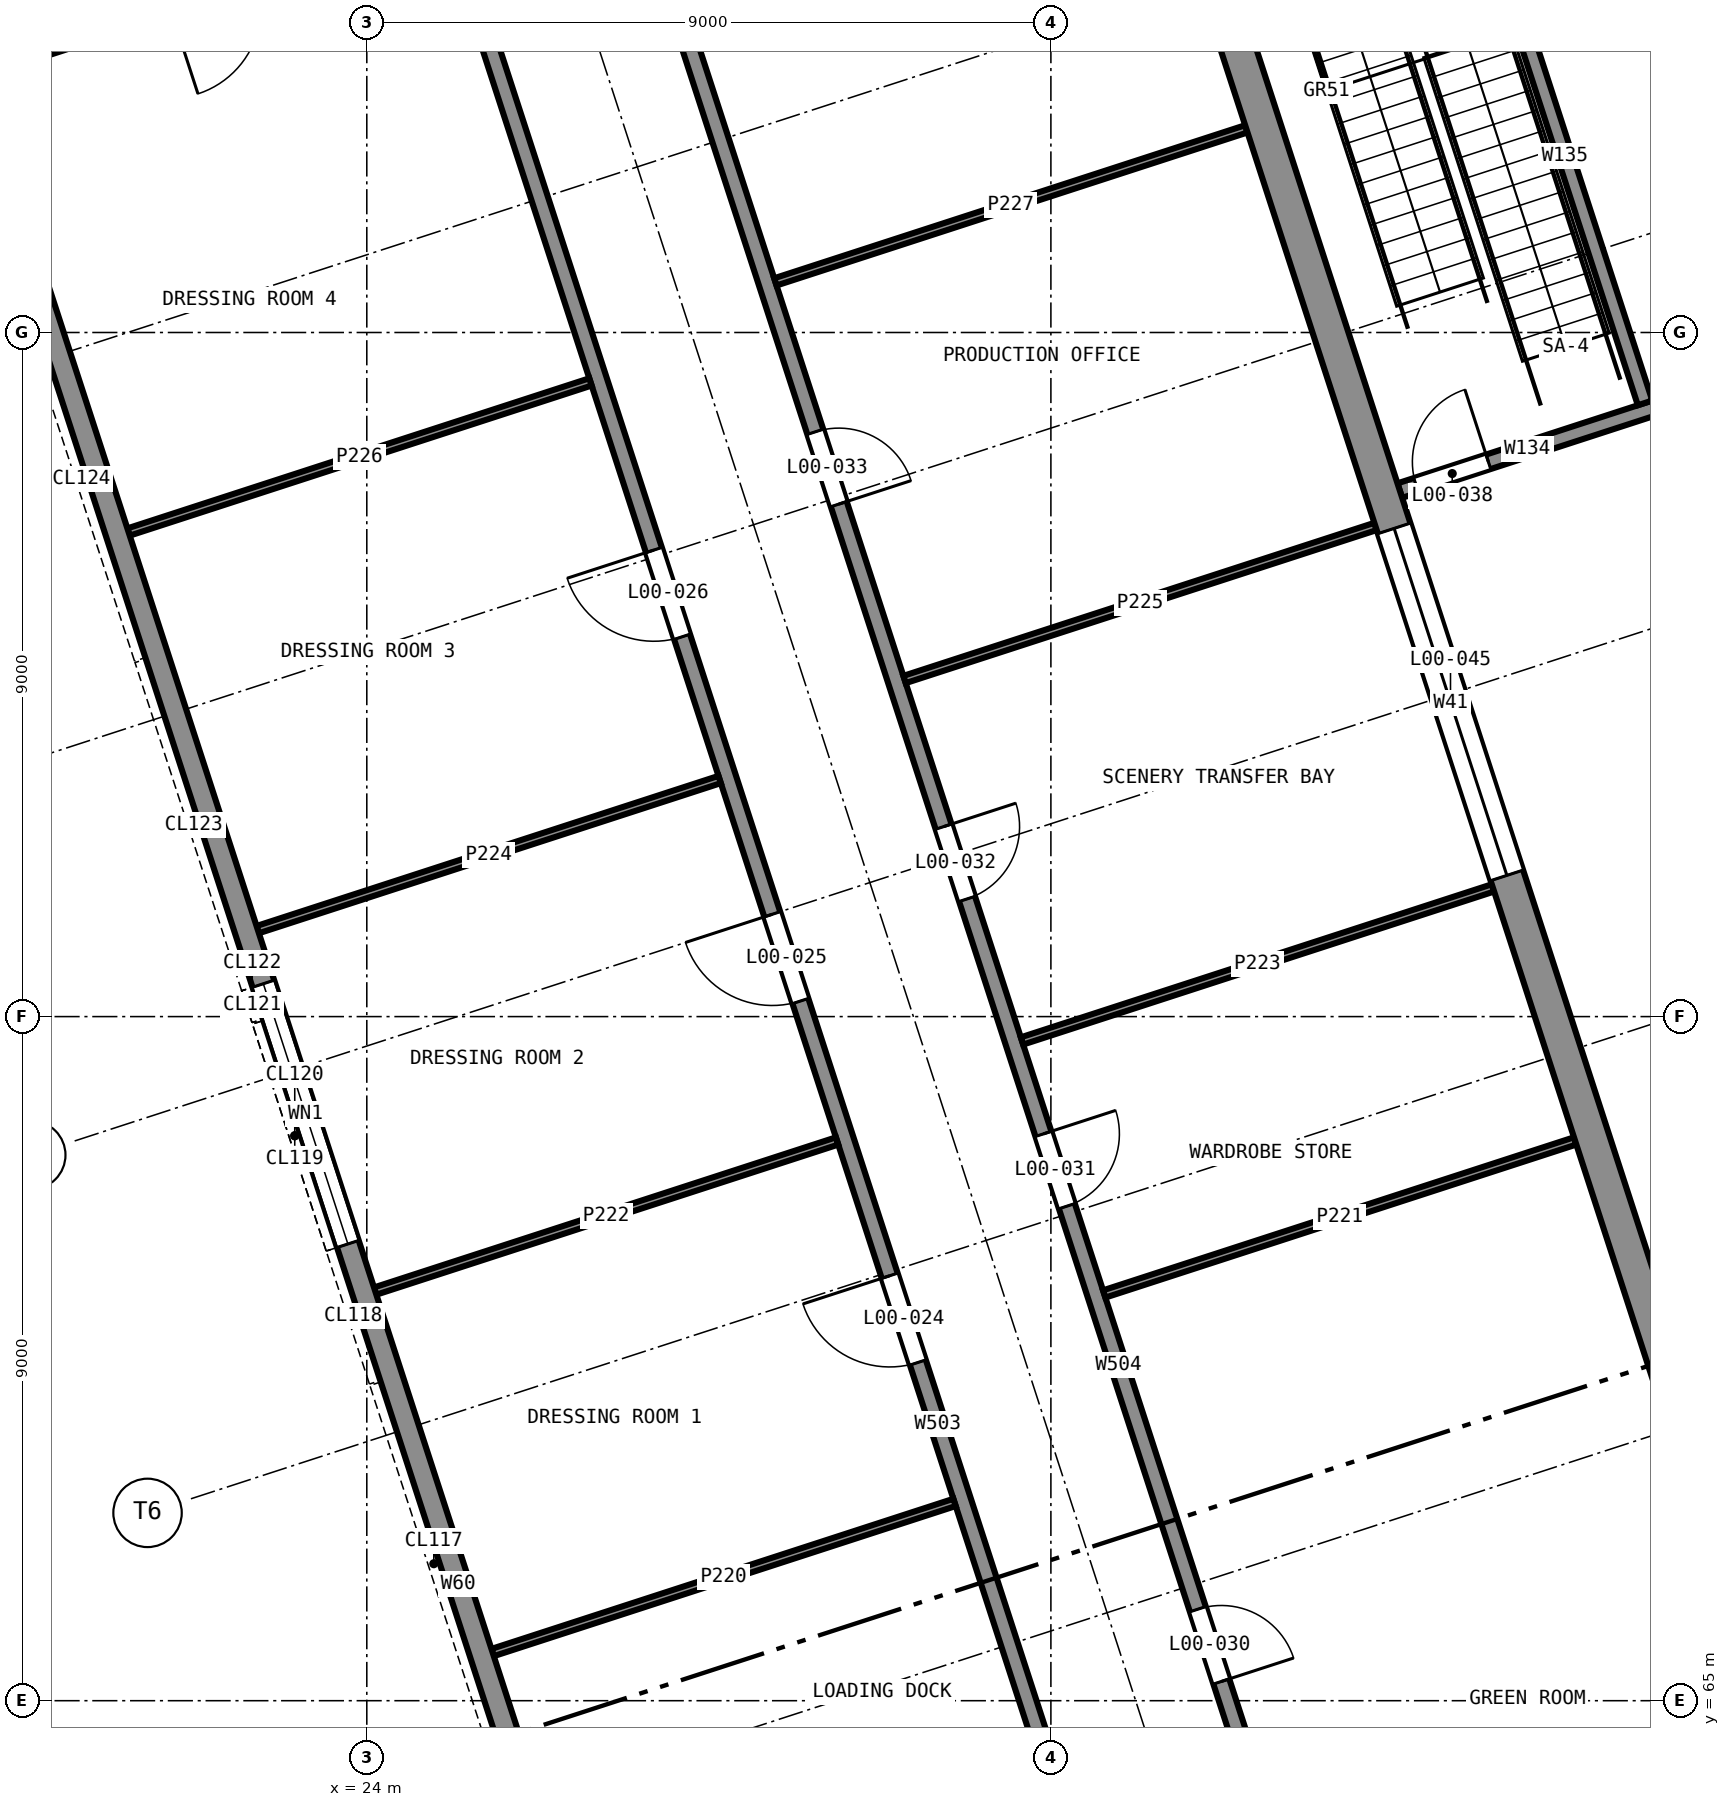
"""IFC4 building model, lengths in metres.
Left out: names, types, materials, properties, quantities, classifications, styles, units other than length and angle.
Written with IfcOpenShell. Run it as: python <this file> out.ifc"""

import sys

from ifc_helpers import new_model, si_unit, direction, frame, frame_2d, origin, place, context, subcontext, project, spatial, rectangle, extrude, element, fill, save


model = new_model("IFC4")
c1 = context("Model", 3, precision=1e-05, world=origin(), true_north=direction((0.0, 1.0)))
c2 = subcontext(c1, "Body", "Model", "MODEL_VIEW")
j1 = project(units=[si_unit("LENGTHUNIT", "METRE"), si_unit("PLANEANGLEUNIT", "RADIAN")], contexts=[c1])
p1 = place(None, origin())
s1 = spatial("IfcSite", under=j1, at=p1, CompositionType="ELEMENT")
p2 = place(p1, origin())
s2 = spatial("IfcBuilding", under=s1, at=p2, CompositionType="ELEMENT")
p3 = place(p2, origin())
s3 = spatial("IfcBuildingStorey", under=s2, at=p3, CompositionType="ELEMENT", Elevation=0.0)
p4 = place(p3, frame((41.286, 68.82, 0.0), z_axis=(0.0, 0.0, 1.0), x_axis=(-0.309008517326, 0.951059270613, 0.0)))
e1 = element("IfcWall", 1, at=p4, inside=s3, PredefinedType="SHEAR", context=c2, shape_type="SweptSolid", body=[
    extrude(rectangle(XDim=19.575, YDim=0.45, at=frame_2d((9.788, 0.0))), origin(), (0.0, 0.0, 1.0), 5.5),
])
p5 = place(p4, frame((7.4, 0.0, 0.0)))
e2 = element("IfcOpeningElement", 2, at=p5, cuts=e1, PredefinedType="OPENING", context=c2, shape_type="SweptSolid", body=[
    extrude(rectangle(XDim=4.8, YDim=4.5, at=frame_2d((2.4, 2.25))), frame((0.0, 0.235, 0.0), z_axis=(0.0, -1.0, 0.0), x_axis=(1.0, 0.0, 0.0)), (0.0, 0.0, 1.0), 0.47),
])
p6 = place(p3, frame((33.501, 41.003, 0.0), z_axis=(0.0, 0.0, 1.0), x_axis=(-0.309017194826, 0.951056451165, 0.0)))
e3 = element("IfcWall", 3, at=p6, inside=s3, PredefinedType="SOLIDWALL", context=c2, shape_type="SweptSolid", body=[
    extrude(rectangle(XDim=53.7, YDim=0.3, at=frame_2d((26.85, 0.0))), origin(), (0.0, 0.0, 1.0), 5.5),
])
p7 = place(p6, frame((31.55, 0.0, 0.9)))
e4 = element("IfcOpeningElement", 4, at=p7, cuts=e3, PredefinedType="OPENING", context=c2, shape_type="SweptSolid", body=[
    extrude(rectangle(XDim=3.6, YDim=2.1, at=frame_2d((1.8, 1.05))), frame((0.0, 0.16, 0.0), z_axis=(0.0, -1.0, 0.0), x_axis=(1.0, 0.0, 0.0)), (0.0, 0.0, 1.0), 0.32),
])
p8 = place(p6, frame((3.0, 0.0, 0.0)))
e5 = element("IfcOpeningElement", 5, at=p8, cuts=e3, PredefinedType="OPENING", context=c2, shape_type="SweptSolid", body=[
    extrude(rectangle(XDim=1.1, YDim=2.1, at=frame_2d((0.55, 1.05))), frame((0.0, 0.16, 0.0), z_axis=(0.0, -1.0, 0.0), x_axis=(1.0, 0.0, 0.0)), (0.0, 0.0, 1.0), 0.32),
])
p9 = place(p6, frame((12.6, 0.0, 0.0)))
e6 = element("IfcOpeningElement", 6, at=p9, cuts=e3, PredefinedType="OPENING", context=c2, shape_type="SweptSolid", body=[
    extrude(rectangle(XDim=4.5, YDim=4.5, at=frame_2d((2.25, 2.25))), frame((0.0, 0.16, 0.0), z_axis=(0.0, -1.0, 0.0), x_axis=(1.0, 0.0, 0.0)), (0.0, 0.0, 1.0), 0.32),
])
p10 = place(p6, frame((19.1, 0.0, 0.0)))
e7 = element("IfcOpeningElement", 7, at=p10, cuts=e3, PredefinedType="OPENING", context=c2, shape_type="SweptSolid", body=[
    extrude(rectangle(XDim=4.5, YDim=4.5, at=frame_2d((2.25, 2.25))), frame((0.0, 0.16, 0.0), z_axis=(0.0, -1.0, 0.0), x_axis=(1.0, 0.0, 0.0)), (0.0, 0.0, 1.0), 0.32),
])
p11 = place(p3, frame((37.591, 80.92, 0.0), z_axis=(0.0, 0.0, 1.0), x_axis=(0.951052389726, 0.30902969436, 0.0)))
e8 = element("IfcWall", 8, at=p11, inside=s3, PredefinedType="SOLIDWALL", context=c2, shape_type="SweptSolid", body=[
    extrude(rectangle(XDim=3.525, YDim=0.2, at=frame_2d((1.763, 0.0))), origin(), (0.0, 0.0, 1.0), 5.5),
])
p12 = place(p11, frame((0.225, 0.0, 0.0)))
e9 = element("IfcOpeningElement", 9, at=p12, cuts=e8, PredefinedType="OPENING", context=c2, shape_type="SweptSolid", body=[
    extrude(rectangle(XDim=1.0, YDim=2.1, at=frame_2d((0.5, 1.05))), frame((0.0, 0.11, 0.0), z_axis=(0.0, -1.0, 0.0), x_axis=(1.0, 0.0, 0.0)), (0.0, 0.0, 1.0), 0.22),
])
p13 = place(p3, frame((40.817, 82.074, 0.0), z_axis=(0.0, 0.0, 1.0), x_axis=(-0.309028643499, 0.951052731186, 0.0)))
e10 = element("IfcWall", 10, at=p13, inside=s3, PredefinedType="SOLIDWALL", context=c2, shape_type="SweptSolid", body=[
    extrude(rectangle(XDim=6.825, YDim=0.2, at=frame_2d((3.413, 0.0))), origin(), (0.0, 0.0, 1.0), 5.5),
])
p14 = place(p3, frame((37.956, 48.812, 0.0), z_axis=(0.0, 0.0, 1.0), x_axis=(-0.30901736393, 0.951056396219, 0.0)))
e11 = element("IfcWall", 11, at=p14, inside=s3, PredefinedType="SOLIDWALL", context=c2, shape_type="SweptSolid", body=[
    extrude(rectangle(XDim=41.7, YDim=0.22, at=frame_2d((20.85, 0.0))), origin(), (0.0, 0.0, 1.0), 5.2),
])
p15 = place(p14, frame((2.009, 0.0, 0.0)))
e12 = element("IfcOpeningElement", 12, at=p15, cuts=e11, PredefinedType="OPENING", context=c2, shape_type="SweptSolid", body=[
    extrude(rectangle(XDim=1.0, YDim=2.1, at=frame_2d((0.5, 1.05))), frame((0.0, 0.12, 0.0), z_axis=(0.0, -1.0, 0.0), x_axis=(1.0, 0.0, 0.0)), (0.0, 0.0, 1.0), 0.24),
])
p16 = place(p14, frame((11.495, 0.0, 0.0)))
e13 = element("IfcOpeningElement", 13, at=p16, cuts=e11, PredefinedType="OPENING", context=c2, shape_type="SweptSolid", body=[
    extrude(rectangle(XDim=1.0, YDim=2.1, at=frame_2d((0.5, 1.05))), frame((0.0, 0.12, 0.0), z_axis=(0.0, -1.0, 0.0), x_axis=(1.0, 0.0, 0.0)), (0.0, 0.0, 1.0), 0.24),
])
p17 = place(p14, frame((21.7, 0.0, 0.0)))
e14 = element("IfcOpeningElement", 14, at=p17, cuts=e11, PredefinedType="OPENING", context=c2, shape_type="SweptSolid", body=[
    extrude(rectangle(XDim=1.2, YDim=2.1, at=frame_2d((0.6, 1.05))), frame((0.0, 0.12, 0.0), z_axis=(0.0, -1.0, 0.0), x_axis=(1.0, 0.0, 0.0)), (0.0, 0.0, 1.0), 0.24),
])
p18 = place(p14, frame((26.7, 0.0, 0.0)))
e15 = element("IfcOpeningElement", 15, at=p18, cuts=e11, PredefinedType="OPENING", context=c2, shape_type="SweptSolid", body=[
    extrude(rectangle(XDim=1.2, YDim=2.1, at=frame_2d((0.6, 1.05))), frame((0.0, 0.12, 0.0), z_axis=(0.0, -1.0, 0.0), x_axis=(1.0, 0.0, 0.0)), (0.0, 0.0, 1.0), 0.24),
])
p19 = place(p14, frame((31.739, 0.0, 0.0)))
e16 = element("IfcOpeningElement", 16, at=p19, cuts=e11, PredefinedType="OPENING", context=c2, shape_type="SweptSolid", body=[
    extrude(rectangle(XDim=1.2, YDim=2.1, at=frame_2d((0.6, 1.05))), frame((0.0, 0.12, 0.0), z_axis=(0.0, -1.0, 0.0), x_axis=(1.0, 0.0, 0.0)), (0.0, 0.0, 1.0), 0.24),
])
p20 = place(p3, frame((40.333, 49.584, 0.0), z_axis=(0.0, 0.0, 1.0), x_axis=(-0.309015643281, 0.951056955291, 0.0)))
e17 = element("IfcWall", 17, at=p20, inside=s3, PredefinedType="SOLIDWALL", context=c2, shape_type="SweptSolid", body=[
    extrude(rectangle(XDim=41.7, YDim=0.22, at=frame_2d((20.85, 0.0))), origin(), (0.0, 0.0, 1.0), 5.2),
])
p21 = place(p20, frame((1.9, 0.0, 0.0)))
e18 = element("IfcOpeningElement", 18, at=p21, cuts=e17, PredefinedType="OPENING", context=c2, shape_type="SweptSolid", body=[
    extrude(rectangle(XDim=1.2, YDim=2.1, at=frame_2d((0.6, 1.05))), frame((0.0, 0.12, 0.0), z_axis=(0.0, -1.0, 0.0), x_axis=(1.0, 0.0, 0.0)), (0.0, 0.0, 1.0), 0.24),
])
p22 = place(p20, frame((8.185, 0.0, 0.0)))
e19 = element("IfcOpeningElement", 19, at=p22, cuts=e17, PredefinedType="OPENING", context=c2, shape_type="SweptSolid", body=[
    extrude(rectangle(XDim=1.2, YDim=2.1, at=frame_2d((0.6, 1.05))), frame((0.0, 0.12, 0.0), z_axis=(0.0, -1.0, 0.0), x_axis=(1.0, 0.0, 0.0)), (0.0, 0.0, 1.0), 0.24),
])
p23 = place(p20, frame((16.475, 0.0, 0.0)))
e20 = element("IfcOpeningElement", 20, at=p23, cuts=e17, PredefinedType="OPENING", context=c2, shape_type="SweptSolid", body=[
    extrude(rectangle(XDim=1.0, YDim=2.1, at=frame_2d((0.5, 1.05))), frame((0.0, 0.12, 0.0), z_axis=(0.0, -1.0, 0.0), x_axis=(1.0, 0.0, 0.0)), (0.0, 0.0, 1.0), 0.24),
])
p24 = place(p20, frame((23.05, 0.0, 0.0)))
e21 = element("IfcOpeningElement", 21, at=p24, cuts=e17, PredefinedType="OPENING", context=c2, shape_type="SweptSolid", body=[
    extrude(rectangle(XDim=1.0, YDim=2.1, at=frame_2d((0.5, 1.05))), frame((0.0, 0.12, 0.0), z_axis=(0.0, -1.0, 0.0), x_axis=(1.0, 0.0, 0.0)), (0.0, 0.0, 1.0), 0.24),
])
p25 = place(p20, frame((27.3, 0.0, 0.0)))
e22 = element("IfcOpeningElement", 22, at=p25, cuts=e17, PredefinedType="OPENING", context=c2, shape_type="SweptSolid", body=[
    extrude(rectangle(XDim=1.0, YDim=2.1, at=frame_2d((0.5, 1.05))), frame((0.0, 0.12, 0.0), z_axis=(0.0, -1.0, 0.0), x_axis=(1.0, 0.0, 0.0)), (0.0, 0.0, 1.0), 0.24),
])
p26 = place(p20, frame((32.761, 0.0, 0.0)))
e23 = element("IfcOpeningElement", 23, at=p26, cuts=e17, PredefinedType="OPENING", context=c2, shape_type="SweptSolid", body=[
    extrude(rectangle(XDim=1.0, YDim=2.1, at=frame_2d((0.5, 1.05))), frame((0.0, 0.12, 0.0), z_axis=(0.0, -1.0, 0.0), x_axis=(1.0, 0.0, 0.0)), (0.0, 0.0, 1.0), 0.24),
])
p27 = place(p3, frame((18.888, 86.462, 0.0), z_axis=(0.0, 0.0, 1.0), x_axis=(0.951059735424, 0.30900708674, 0.0)))
e24 = element("IfcWall", 24, at=p27, inside=s3, PredefinedType="SOLIDWALL", context=c2, shape_type="SweptSolid", body=[
    extrude(rectangle(XDim=6.5, YDim=0.22, at=frame_2d((3.25, 0.0))), origin(), (0.0, 0.0, 1.0), 5.2),
])
p28 = place(p27, frame((2.65, 0.0, 0.0)))
e25 = element("IfcOpeningElement", 25, at=p28, cuts=e24, PredefinedType="OPENING", context=c2, shape_type="SweptSolid", body=[
    extrude(rectangle(XDim=1.2, YDim=2.1, at=frame_2d((0.6, 1.05))), frame((0.0, 0.12, 0.0), z_axis=(0.0, -1.0, 0.0), x_axis=(1.0, 0.0, 0.0)), (0.0, 0.0, 1.0), 0.24),
])
p29 = place(p3, frame((25.655, 65.634, 0.0), z_axis=(0.0, 0.0, 1.0), x_axis=(0.951055405517, 0.309020412977, 0.0)))
e26 = element("IfcWall", 26, at=p29, inside=s3, PredefinedType="PARTITIONING", context=c2, shape_type="SweptSolid", body=[
    extrude(rectangle(XDim=6.39, YDim=0.1, at=frame_2d((3.195, 0.0))), origin(), (0.0, 0.0, 1.0), 5.2),
])
p30 = place(p3, frame((33.701, 70.351, 0.0), z_axis=(0.0, 0.0, 1.0), x_axis=(0.951058024796, 0.309012351648, 0.0)))
e27 = element("IfcWall", 27, at=p30, inside=s3, PredefinedType="PARTITIONING", context=c2, shape_type="SweptSolid", body=[
    extrude(rectangle(XDim=6.515, YDim=0.1, at=frame_2d((3.257, 0.0))), origin(), (0.0, 0.0, 1.0), 5.2),
])
p31 = place(p3, frame((24.11, 70.389, 0.0), z_axis=(0.0, 0.0, 1.0), x_axis=(0.951059053869, 0.309009184417, 0.0)))
e28 = element("IfcWall", 28, at=p31, inside=s3, PredefinedType="PARTITIONING", context=c2, shape_type="SweptSolid", body=[
    extrude(rectangle(XDim=6.39, YDim=0.1, at=frame_2d((3.195, 0.0))), origin(), (0.0, 0.0, 1.0), 5.2),
])
p32 = place(p3, frame((32.62, 73.68, 0.0), z_axis=(0.0, 0.0, 1.0), x_axis=(0.951058024796, 0.309012351648, 0.0)))
e29 = element("IfcWall", 29, at=p32, inside=s3, PredefinedType="PARTITIONING", context=c2, shape_type="SweptSolid", body=[
    extrude(rectangle(XDim=6.515, YDim=0.1, at=frame_2d((3.257, 0.0))), origin(), (0.0, 0.0, 1.0), 5.2),
])
p33 = place(p3, frame((22.565, 75.144, 0.0), z_axis=(0.0, 0.0, 1.0), x_axis=(0.951055405517, 0.309020412977, 0.0)))
e30 = element("IfcWall", 30, at=p33, inside=s3, PredefinedType="PARTITIONING", context=c2, shape_type="SweptSolid", body=[
    extrude(rectangle(XDim=6.39, YDim=0.1, at=frame_2d((3.195, 0.0))), origin(), (0.0, 0.0, 1.0), 5.2),
])
p34 = place(p3, frame((31.075, 78.435, 0.0), z_axis=(0.0, 0.0, 1.0), x_axis=(0.951058024796, 0.309012351648, 0.0)))
e31 = element("IfcWall", 31, at=p34, inside=s3, PredefinedType="PARTITIONING", context=c2, shape_type="SweptSolid", body=[
    extrude(rectangle(XDim=6.515, YDim=0.1, at=frame_2d((3.257, 0.0))), origin(), (0.0, 0.0, 1.0), 5.2),
])
p35 = place(p3, frame((20.865, 80.375, 0.0), z_axis=(0.0, 0.0, 1.0), x_axis=(0.951055405517, 0.309020412977, 0.0)))
e32 = element("IfcWall", 32, at=p35, inside=s3, PredefinedType="PARTITIONING", context=c2, shape_type="SweptSolid", body=[
    extrude(rectangle(XDim=6.39, YDim=0.1, at=frame_2d((3.195, 0.0))), origin(), (0.0, 0.0, 1.0), 5.2),
])
p36 = place(p3, frame((29.375, 83.666, 0.0), z_axis=(0.0, 0.0, 1.0), x_axis=(0.951061602966, 0.309001338773, 0.0)))
e33 = element("IfcWall", 33, at=p36, inside=s3, PredefinedType="PARTITIONING", context=c2, shape_type="SweptSolid", body=[
    extrude(rectangle(XDim=6.515, YDim=0.1, at=frame_2d((3.258, 0.0))), origin(), (0.0, 0.0, 1.0), 5.2),
])
p37 = place(p7, origin())
e34 = element("IfcWindow", 34, at=p37, inside=s3, PartitioningType="SINGLE_PANEL", PredefinedType="WINDOW", context=c2, shape_type="SweptSolid", body=[
    extrude(rectangle(XDim=3.6, YDim=2.1, at=frame_2d((1.8, 1.05))), frame((0.0, 0.03, 0.0), z_axis=(0.0, -1.0, 0.0), x_axis=(1.0, 0.0, 0.0)), (0.0, 0.0, 1.0), 0.06),
])
fill(e4, e34)
p38 = place(p17, origin())
e35 = element("IfcDoor", 35, at=p38, inside=s3, OperationType="SINGLE_SWING_LEFT", PredefinedType="DOOR", context=c2, shape_type="SweptSolid", body=[
    extrude(rectangle(XDim=1.2, YDim=2.1, at=frame_2d((0.6, 1.05))), frame((0.0, 0.025, 0.0), z_axis=(0.0, -1.0, 0.0), x_axis=(1.0, 0.0, 0.0)), (0.0, 0.0, 1.0), 0.05),
])
fill(e14, e35)
p39 = place(p18, origin())
e36 = element("IfcDoor", 36, at=p39, inside=s3, OperationType="SINGLE_SWING_LEFT", PredefinedType="DOOR", context=c2, shape_type="SweptSolid", body=[
    extrude(rectangle(XDim=1.2, YDim=2.1, at=frame_2d((0.6, 1.05))), frame((0.0, 0.025, 0.0), z_axis=(0.0, -1.0, 0.0), x_axis=(1.0, 0.0, 0.0)), (0.0, 0.0, 1.0), 0.05),
])
fill(e15, e36)
p40 = place(p19, origin())
e37 = element("IfcDoor", 37, at=p40, inside=s3, OperationType="SINGLE_SWING_LEFT", PredefinedType="DOOR", context=c2, shape_type="SweptSolid", body=[
    extrude(rectangle(XDim=1.2, YDim=2.1, at=frame_2d((0.6, 1.05))), frame((0.0, 0.025, 0.0), z_axis=(0.0, -1.0, 0.0), x_axis=(1.0, 0.0, 0.0)), (0.0, 0.0, 1.0), 0.05),
])
fill(e16, e37)
p41 = place(p23, frame((1.0, 0.0, 0.0), z_axis=(0.0, 0.0, 1.0), x_axis=(-1.0, 0.0, 0.0)))
e38 = element("IfcDoor", 38, at=p41, inside=s3, OperationType="SINGLE_SWING_LEFT", PredefinedType="DOOR", context=c2, shape_type="SweptSolid", body=[
    extrude(rectangle(XDim=1.0, YDim=2.1, at=frame_2d((0.5, 1.05))), frame((0.0, 0.025, 0.0), z_axis=(0.0, -1.0, 0.0), x_axis=(1.0, 0.0, 0.0)), (0.0, 0.0, 1.0), 0.05),
])
fill(e20, e38)
p42 = place(p24, frame((1.0, 0.0, 0.0), z_axis=(0.0, 0.0, 1.0), x_axis=(-1.0, 0.0, 0.0)))
e39 = element("IfcDoor", 39, at=p42, inside=s3, OperationType="SINGLE_SWING_RIGHT", PredefinedType="DOOR", context=c2, shape_type="SweptSolid", body=[
    extrude(rectangle(XDim=1.0, YDim=2.1, at=frame_2d((0.5, 1.05))), frame((0.0, 0.025, 0.0), z_axis=(0.0, -1.0, 0.0), x_axis=(1.0, 0.0, 0.0)), (0.0, 0.0, 1.0), 0.05),
])
fill(e21, e39)
p43 = place(p25, frame((1.0, 0.0, 0.0), z_axis=(0.0, 0.0, 1.0), x_axis=(-1.0, 0.0, 0.0)))
e40 = element("IfcDoor", 40, at=p43, inside=s3, OperationType="SINGLE_SWING_RIGHT", PredefinedType="DOOR", context=c2, shape_type="SweptSolid", body=[
    extrude(rectangle(XDim=1.0, YDim=2.1, at=frame_2d((0.5, 1.05))), frame((0.0, 0.025, 0.0), z_axis=(0.0, -1.0, 0.0), x_axis=(1.0, 0.0, 0.0)), (0.0, 0.0, 1.0), 0.05),
])
fill(e22, e40)
p44 = place(p26, frame((1.0, 0.0, 0.0), z_axis=(0.0, 0.0, 1.0), x_axis=(-1.0, 0.0, 0.0)))
e41 = element("IfcDoor", 41, at=p44, inside=s3, OperationType="SINGLE_SWING_LEFT", PredefinedType="DOOR", context=c2, shape_type="SweptSolid", body=[
    extrude(rectangle(XDim=1.0, YDim=2.1, at=frame_2d((0.5, 1.05))), frame((0.0, 0.025, 0.0), z_axis=(0.0, -1.0, 0.0), x_axis=(1.0, 0.0, 0.0)), (0.0, 0.0, 1.0), 0.05),
])
fill(e23, e41)
p45 = place(p12, origin())
e42 = element("IfcDoor", 42, at=p45, inside=s3, OperationType="SINGLE_SWING_LEFT", PredefinedType="DOOR", context=c2, shape_type="SweptSolid", body=[
    extrude(rectangle(XDim=1.0, YDim=2.1, at=frame_2d((0.5, 1.05))), frame((0.0, 0.025, 0.0), z_axis=(0.0, -1.0, 0.0), x_axis=(1.0, 0.0, 0.0)), (0.0, 0.0, 1.0), 0.05),
])
fill(e9, e42)
p46 = place(p5, origin())
e43 = element("IfcDoor", 43, at=p46, inside=s3, OperationType="SLIDING_TO_LEFT", PredefinedType="DOOR", context=c2, shape_type="SweptSolid", body=[
    extrude(rectangle(XDim=4.8, YDim=4.5, at=frame_2d((2.4, 2.25))), frame((0.0, 0.025, 0.0), z_axis=(0.0, -1.0, 0.0), x_axis=(1.0, 0.0, 0.0)), (0.0, 0.0, 1.0), 0.05),
])
fill(e2, e43)
save(model, sys.argv[1])
